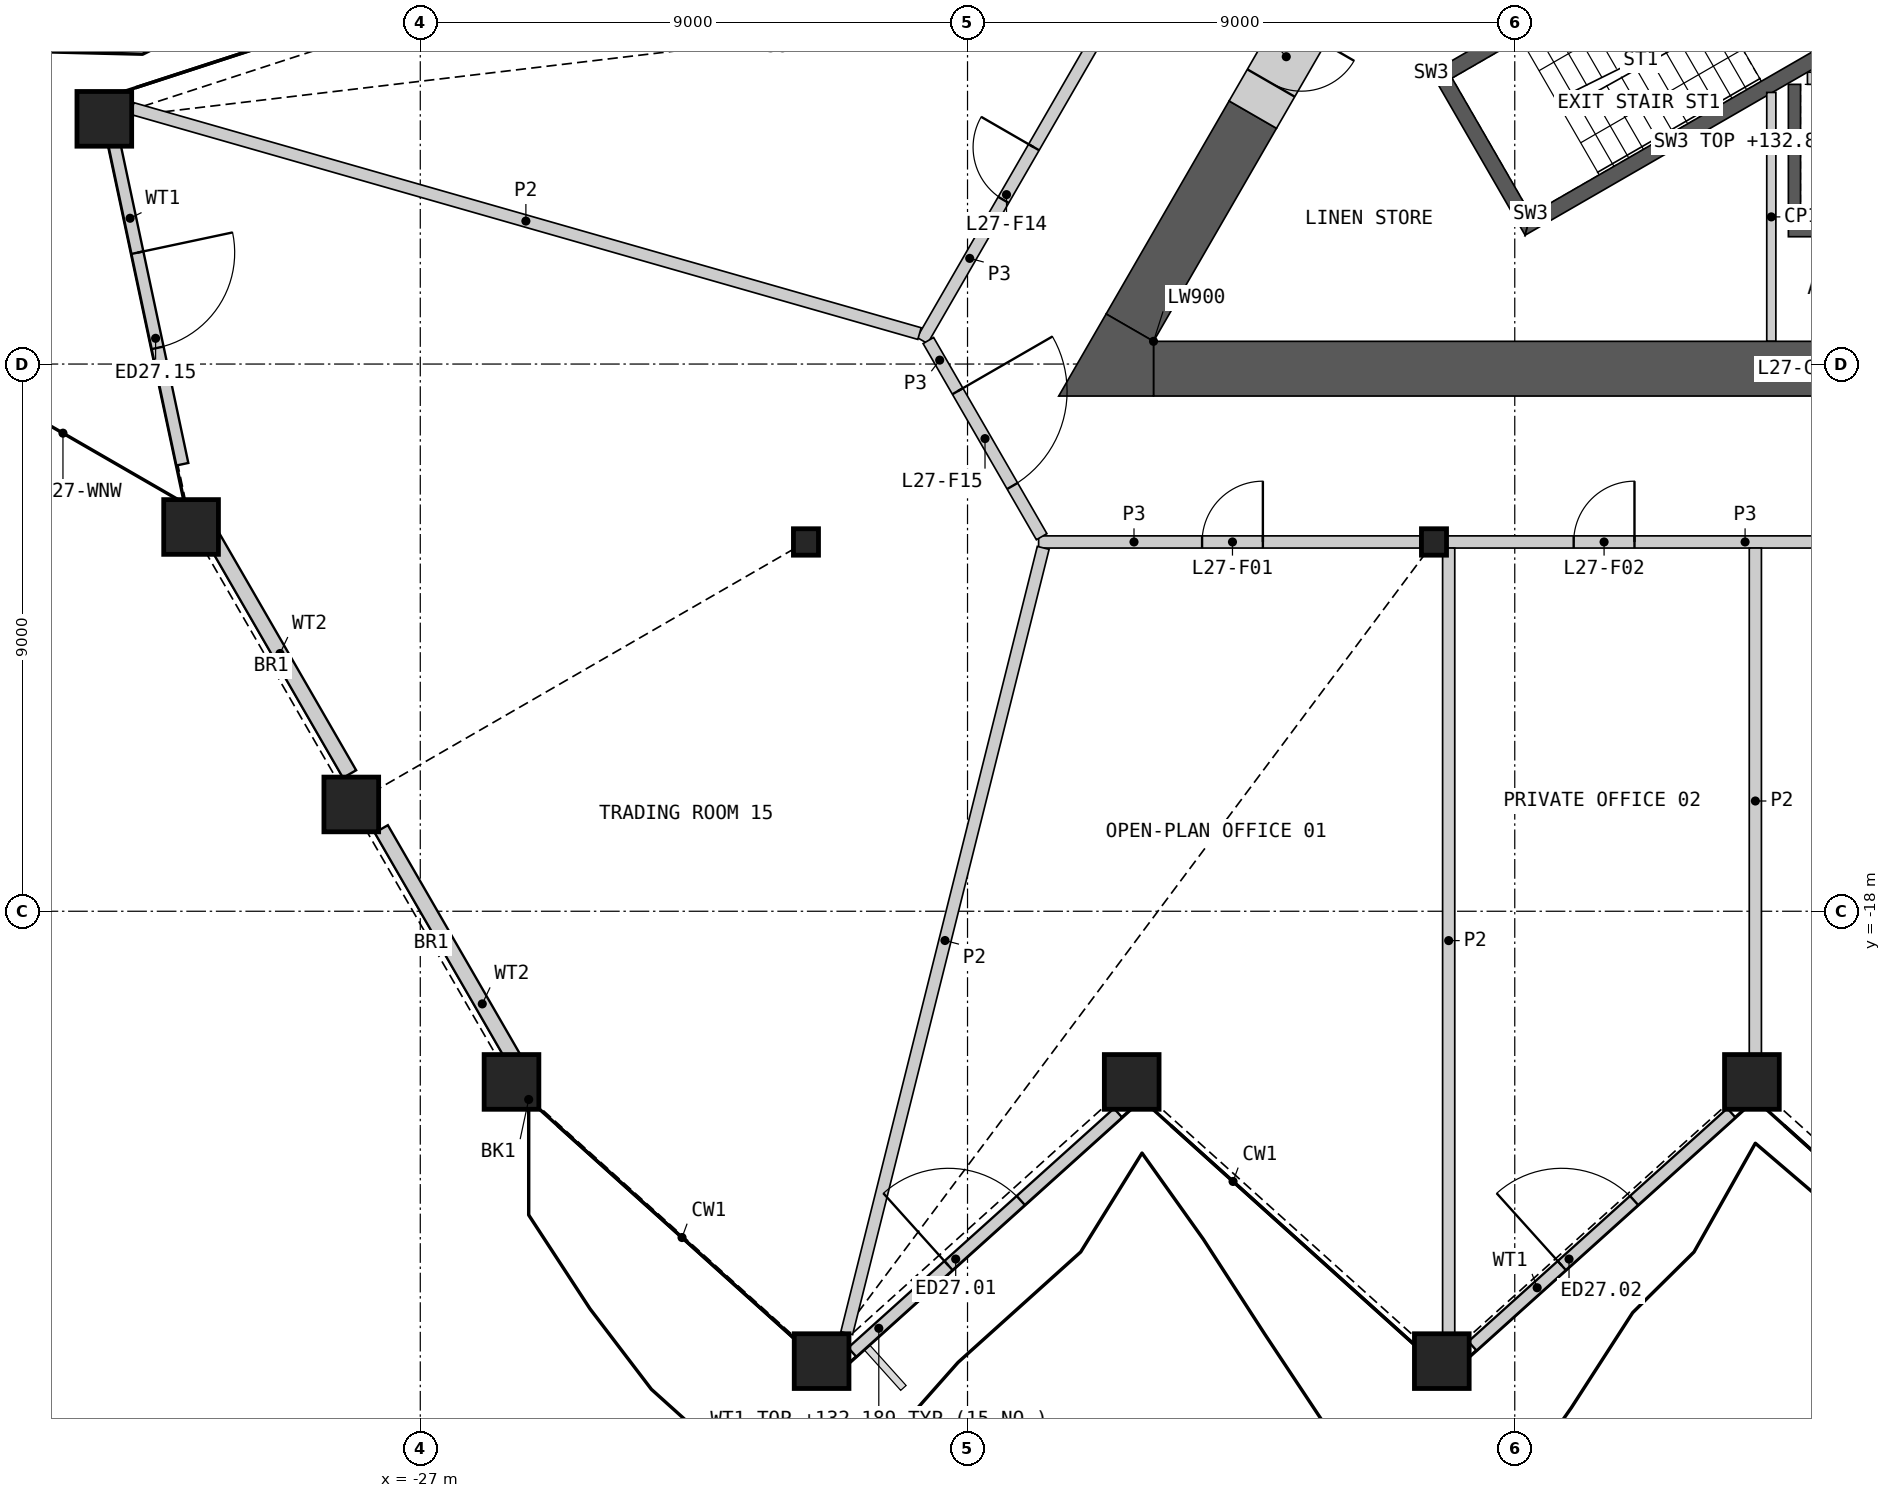
"""IFC4 building model, lengths in metres.
Left out: names, types, materials, properties, quantities, classifications, styles, units other than length and angle.
Written with IfcOpenShell. Run it as: python <this file> out.ifc"""

import sys

from ifc_helpers import new_model, si_unit, direction, frame, frame_2d, origin, origin_2d, place, context, subcontext, project, spatial, polyline, rectangle, hollow_rectangle, i_section, outline, extrude, element, fill, save


model = new_model("IFC4")
c1 = context("Model", 3, precision=1e-05, world=origin(), true_north=direction((0.0, 1.0)))
c2 = subcontext(c1, "Body", "Model", "MODEL_VIEW")
j1 = project(units=[si_unit("LENGTHUNIT", "METRE"), si_unit("PLANEANGLEUNIT", "RADIAN")], contexts=[c1])
p1 = place(None, origin())
s1 = spatial("IfcSite", under=j1, at=p1, CompositionType="ELEMENT")
p2 = place(p1, origin())
s2 = spatial("IfcBuilding", under=s1, at=p2, CompositionType="ELEMENT")
p3 = place(p2, frame((0.0, 0.0, 129.0)))
s3 = spatial("IfcBuildingStorey", under=s2, at=p3, CompositionType="ELEMENT", Elevation=129.0)
for number, where, z_axis, x_axis in (
    (1, (-25.5, -20.807, 0.0), (0.0, 0.0, 1.0), (1.0, 0.0, 0.0)),
    (2, (-20.4, -25.399, 0.0), (0.0, 0.0, 1.0), (1.0, 0.0, 0.0)),
    (3, (-15.3, -20.807, 0.0), (0.0, 0.0, 1.0), (1.0, 0.0, 0.0)),
    (4, (-10.2, -25.399, 0.0), (0.0, 0.0, 1.0), (1.0, 0.0, 0.0)),
    (5, (-5.1, -20.807, 0.0), (0.0, 0.0, 1.0), (1.0, 0.0, 0.0)),
    (6, (-32.196, -4.967, 0.0), (0.0, 0.0, 1.0), (1.0, 0.0, 0.0)),
    (7, (-30.769, -11.68, 0.0), (0.0, 0.0, 1.0), (1.0, 0.0, 0.0)),
    (8, (-28.135, -16.243, 0.0), (0.0, 0.0, 1.0), (1.0, 0.0, 0.0)),
):
    element("IfcColumn", number, at=place(p3, frame(where, z_axis=z_axis, x_axis=x_axis)), inside=s3, PredefinedType="COLUMN", context=c2, shape_type="SweptSolid", body=[
        extrude(hollow_rectangle(XDim=0.9, YDim=0.9, WallThickness=0.06, at=origin_2d()), origin(), (0.0, 0.0, 1.0), 4.2),
    ])
for number, where, z_axis, x_axis in (
    (9, (-20.657, -11.926, 0.0), (0.0, 0.0, 1.0), (1.0, 0.0, 0.0)),
    (10, (-10.328, -11.926, 0.0), (0.0, 0.0, 1.0), (1.0, 0.0, 0.0)),
):
    element("IfcColumn", number, at=place(p3, frame(where, z_axis=z_axis, x_axis=x_axis)), inside=s3, PredefinedType="COLUMN", context=c2, shape_type="SweptSolid", body=[
        extrude(i_section(OverallWidth=0.412, OverallDepth=0.435, WebThickness=0.036, FlangeThickness=0.057, at=origin_2d()), origin(), (0.0, 0.0, 1.0), 4.2),
    ])
p4 = place(p3, frame((-19.896, -25.253, 0.0), z_axis=(0.0, 0.0, 1.0), x_axis=(0.743157926671, 0.669116055723, 0.0)))
e11 = element("IfcWall", 11, at=p4, inside=s3, PredefinedType="SOLIDWALL", context=c2, shape_type="SweptSolid", body=[
    extrude(rectangle(XDim=5.882, YDim=0.2, at=frame_2d((2.941, 0.0))), origin(), (0.0, 0.0, 1.0), 3.189),
])
p5 = place(p4, frame((2.13, 0.0, 0.0)))
e12 = element("IfcOpeningElement", 12, at=p5, cuts=e11, PredefinedType="OPENING", context=c2, shape_type="SweptSolid", body=[
    extrude(rectangle(XDim=1.6, YDim=2.4, at=frame_2d((0.8, 1.2))), frame((0.0, 0.11, 0.0), z_axis=(0.0, -1.0, 0.0), x_axis=(1.0, 0.0, 0.0)), (0.0, 0.0, 1.0), 0.22),
])
p6 = place(p3, frame((-9.696, -25.151, 0.0), z_axis=(0.0, 0.0, 1.0), x_axis=(0.743141591148, 0.669134198428, 0.0)))
e13 = element("IfcWall", 13, at=p6, inside=s3, PredefinedType="SOLIDWALL", context=c2, shape_type="SweptSolid", body=[
    extrude(rectangle(XDim=5.73, YDim=0.2, at=frame_2d((2.865, 0.0))), origin(), (0.0, 0.0, 1.0), 3.189),
])
p7 = place(p6, frame((1.978, 0.0, 0.0)))
e14 = element("IfcOpeningElement", 14, at=p7, cuts=e13, PredefinedType="OPENING", context=c2, shape_type="SweptSolid", body=[
    extrude(rectangle(XDim=1.6, YDim=2.4, at=frame_2d((0.8, 1.2))), frame((0.0, 0.11, 0.0), z_axis=(0.0, -1.0, 0.0), x_axis=(1.0, 0.0, 0.0)), (0.0, 0.0, 1.0), 0.22),
])
p8 = place(p3, frame((-32.059, -5.254, 0.0), z_axis=(0.0, 0.0, 1.0), x_axis=(0.207902173992, -0.978149623549, 0.0)))
e15 = element("IfcWall", 15, at=p8, inside=s3, PredefinedType="SOLIDWALL", context=c2, shape_type="SweptSolid", body=[
    extrude(rectangle(XDim=5.515, YDim=0.2, at=frame_2d((2.757, 0.0))), origin(), (0.0, 0.0, 1.0), 3.189),
])
p9 = place(p8, frame((1.957, 0.0, 0.0)))
e16 = element("IfcOpeningElement", 16, at=p9, cuts=e15, PredefinedType="OPENING", context=c2, shape_type="SweptSolid", body=[
    extrude(rectangle(XDim=1.6, YDim=2.4, at=frame_2d((0.8, 1.2))), frame((0.0, 0.11, 0.0), z_axis=(0.0, -1.0, 0.0), x_axis=(1.0, 0.0, 0.0)), (0.0, 0.0, 1.0), 0.22),
])
p10 = place(p3, frame((-30.452, -11.779, 0.0), z_axis=(0.0, 0.0, 1.0), x_axis=(0.500016357846, -0.866015959371, 0.0)))
e17 = element("IfcWall", 17, at=p10, inside=s3, PredefinedType="SOLIDWALL", context=c2, shape_type="SweptSolid", body=[
    extrude(rectangle(XDim=4.578, YDim=0.25, at=frame_2d((2.289, 0.0))), origin(), (0.0, 0.0, 1.0), 3.189),
])
p11 = place(p3, frame((-27.641, -16.647, 0.0), z_axis=(0.0, 0.0, 1.0), x_axis=(0.499968989506, -0.866043306961, 0.0)))
e18 = element("IfcWall", 18, at=p11, inside=s3, PredefinedType="SOLIDWALL", context=c2, shape_type="SweptSolid", body=[
    extrude(rectangle(XDim=4.429, YDim=0.25, at=frame_2d((2.214, 0.0))), origin(), (0.0, 0.0, 1.0), 3.189),
])
p12 = place(p3, origin())
e19 = element("IfcWall", 19, at=p12, inside=s3, PredefinedType="SHEAR", context=c2, shape_type="SweptSolid", body=[
    extrude(outline(polyline([(4.5, -4.4), (4.5, -6.906), (-4.5, -6.906), (-4.5, -4.4), (-4.3, -4.4), (-4.3, -6.7), (-2.3, -6.7), (-2.3, -4.4), (-2.1, -4.4), (-2.1, -6.7), (-0.1, -6.7), (-0.1, -4.4), (0.1, -4.4), (0.1, -6.7), (2.1, -6.7), (2.1, -4.4), (2.3, -4.4), (2.3, -6.7), (4.3, -6.7), (4.3, -4.4), (4.5, -4.4)])), origin(), (0.0, 0.0, 1.0), 3.8),
])
p13 = place(p3, frame((-4.187, -4.3, 0.0), z_axis=(0.0, 0.0, 1.0), x_axis=(1.0, 0.0, 0.0)))
e20 = element("IfcWall", 20, at=p13, inside=s3, PredefinedType="SOLIDWALL", context=c2, shape_type="SweptSolid", body=[
    extrude(rectangle(XDim=8.373, YDim=0.2, at=frame_2d((4.187, 0.0))), origin(), (0.0, 0.0, 1.0), 3.8),
])
p14 = place(p13, frame((0.287, 0.0, 0.0)))
e21 = element("IfcOpeningElement", 21, at=p14, cuts=e20, PredefinedType="OPENING", context=c2, shape_type="SweptSolid", body=[
    extrude(rectangle(XDim=1.2, YDim=2.1, at=frame_2d((0.6, 1.05))), frame((0.0, 0.11, 0.0), z_axis=(0.0, -1.0, 0.0), x_axis=(1.0, 0.0, 0.0)), (0.0, 0.0, 1.0), 0.22),
])
p15 = place(p13, frame((2.387, 0.0, 0.0)))
e22 = element("IfcOpeningElement", 22, at=p15, cuts=e20, PredefinedType="OPENING", context=c2, shape_type="SweptSolid", body=[
    extrude(rectangle(XDim=1.4, YDim=2.1, at=frame_2d((0.7, 1.05))), frame((0.0, 0.11, 0.0), z_axis=(0.0, -1.0, 0.0), x_axis=(1.0, 0.0, 0.0)), (0.0, 0.0, 1.0), 0.22),
])
p16 = place(p13, frame((4.737, 0.0, 0.0)))
e23 = element("IfcOpeningElement", 23, at=p16, cuts=e20, PredefinedType="OPENING", context=c2, shape_type="SweptSolid", body=[
    extrude(rectangle(XDim=1.1, YDim=2.1, at=frame_2d((0.55, 1.05))), frame((0.0, 0.11, 0.0), z_axis=(0.0, -1.0, 0.0), x_axis=(1.0, 0.0, 0.0)), (0.0, 0.0, 1.0), 0.22),
])
p17 = place(p13, frame((6.887, 0.0, 0.0)))
e24 = element("IfcOpeningElement", 24, at=p17, cuts=e20, PredefinedType="OPENING", context=c2, shape_type="SweptSolid", body=[
    extrude(rectangle(XDim=1.2, YDim=2.1, at=frame_2d((0.6, 1.05))), frame((0.0, 0.11, 0.0), z_axis=(0.0, -1.0, 0.0), x_axis=(1.0, 0.0, 0.0)), (0.0, 0.0, 1.0), 0.22),
])
p18 = place(p3, origin())
e25 = element("IfcWall", 25, at=p18, inside=s3, PredefinedType="SHEAR", context=c2, shape_type="SweptSolid", body=[
    extrude(outline(polyline([(-5.307, -1.281), (-10.374, -4.206), (-10.032, -4.298), (-5.182, -1.498), (-5.307, -1.281)])), origin(), (0.0, 0.0, 1.0), 3.8),
])
p19 = place(p3, origin())
e26 = element("IfcWall", 26, at=p19, inside=s3, PredefinedType="SHEAR", context=c2, shape_type="SweptSolid", body=[
    extrude(outline(polyline([(-10.374, -4.206), (-8.83, -6.881), (-8.738, -6.539), (-10.032, -4.298), (-10.374, -4.206)])), origin(), (0.0, 0.0, 1.0), 3.8),
])
p20 = place(p3, origin())
e27 = element("IfcWall", 27, at=p20, inside=s3, PredefinedType="SHEAR", context=c2, shape_type="SweptSolid", body=[
    extrude(outline(polyline([(-8.738, -6.539), (-8.83, -6.881), (-3.763, -3.956), (-3.888, -3.739), (-8.738, -6.539)])), origin(), (0.0, 0.0, 1.0), 3.8),
])
p21 = place(p3, frame((-5.199, -1.219, 0.0), z_axis=(0.0, 0.0, 1.0), x_axis=(0.499982516597, -0.866035497597, 0.0)))
e28 = element("IfcWall", 28, at=p21, inside=s3, PredefinedType="SHEAR", context=c2, shape_type="SweptSolid", body=[
    extrude(rectangle(XDim=3.088, YDim=0.25, at=frame_2d((1.544, 0.0))), origin(), (0.0, 0.0, 1.0), 3.8),
])
p22 = place(p21, frame((0.994, 0.0, 0.0)))
e29 = element("IfcOpeningElement", 29, at=p22, cuts=e28, PredefinedType="OPENING", context=c2, shape_type="SweptSolid", body=[
    extrude(rectangle(XDim=1.1, YDim=2.1, at=frame_2d((0.55, 1.05))), frame((0.0, 0.135, 0.0), z_axis=(0.0, -1.0, 0.0), x_axis=(1.0, 0.0, 0.0)), (0.0, 0.0, 1.0), 0.27),
])
p23 = place(p3, frame((-4.781, -8.626, 0.0), z_axis=(0.0, 0.0, 1.0), x_axis=(0.0, 1.0, 0.0)))
e30 = element("IfcWall", 30, at=p23, inside=s3, PredefinedType="PARTITIONING", context=c2, shape_type="SweptSolid", body=[
    extrude(rectangle(XDim=4.093, YDim=0.15, at=frame_2d((2.047, 0.0))), origin(), (0.0, 0.0, 1.0), 3.8),
])
p24 = place(p3, frame((-14.941, -9.076, 0.0), z_axis=(0.0, 0.0, 1.0), x_axis=(1.0, 0.0, 0.0)))
e31 = element("IfcWall", 31, at=p24, inside=s3, PredefinedType="SHEAR", context=c2, shape_type="SweptSolid", body=[
    extrude(rectangle(XDim=11.275, YDim=0.9, at=frame_2d((5.638, 0.0))), origin(), (0.0, 0.0, 1.0), 3.8),
])
p25 = place(p3, frame((-13.308, -4.898, 0.0), z_axis=(0.0, 0.0, 1.0), x_axis=(-0.499974938593, -0.866039872511, 0.0)))
e32 = element("IfcWall", 32, at=p25, inside=s3, PredefinedType="SHEAR", context=c2, shape_type="SweptSolid", body=[
    extrude(rectangle(XDim=4.046, YDim=0.9, at=frame_2d((2.023, 0.0))), origin(), (0.0, 0.0, 1.0), 3.8),
])
p26 = place(p3, origin())
e33 = element("IfcWall", 33, at=p26, inside=s3, PredefinedType="SHEAR", context=c2, shape_type="SweptSolid", body=[
    extrude(outline(polyline([(-14.941, -8.626), (-14.941, -9.526), (-16.5, -9.526), (-15.721, -8.176), (-14.941, -8.626)])), origin(), (0.0, 0.0, 1.0), 3.8),
])
p27 = place(p3, frame((-12.208, -2.992, 0.0), z_axis=(0.0, 0.0, 1.0), x_axis=(-0.50002983664, -0.866008176907, 0.0)))
e34 = element("IfcWall", 34, at=p27, inside=s3, PredefinedType="SHEAR", context=c2, shape_type="SweptSolid", body=[
    extrude(rectangle(XDim=2.2, YDim=0.9, at=frame_2d((1.1, 0.0))), origin(), (0.0, 0.0, 1.0), 3.8),
])
p28 = place(p27, frame((0.6, 0.0, 0.0)))
e35 = element("IfcOpeningElement", 35, at=p28, cuts=e34, PredefinedType="OPENING", context=c2, shape_type="SweptSolid", body=[
    extrude(rectangle(XDim=1.0, YDim=2.1, at=frame_2d((0.5, 1.05))), frame((0.0, 0.46, 0.0), z_axis=(0.0, -1.0, 0.0), x_axis=(1.0, 0.0, 0.0)), (0.0, 0.0, 1.0), 0.92),
])
p29 = place(p3, frame((-10.197, -11.926, 0.0), z_axis=(0.0, 0.0, 1.0), x_axis=(1.0, 0.0, 0.0)))
e36 = element("IfcWall", 36, at=p29, inside=s3, PredefinedType="PARTITIONING", context=c2, shape_type="SweptSolid", body=[
    extrude(rectangle(XDim=9.969, YDim=0.2, at=frame_2d((4.985, 0.0))), origin(), (0.0, 0.0, 1.0), 3.8),
])
p30 = place(p29, frame((2.166, 0.0, 0.0)))
e37 = element("IfcOpeningElement", 37, at=p30, cuts=e36, PredefinedType="OPENING", context=c2, shape_type="SweptSolid", body=[
    extrude(rectangle(XDim=1.0, YDim=2.1, at=frame_2d((0.5, 1.05))), frame((0.0, 0.11, 0.0), z_axis=(0.0, -1.0, 0.0), x_axis=(1.0, 0.0, 0.0)), (0.0, 0.0, 1.0), 0.22),
])
p31 = place(p29, frame((7.106, 0.0, 0.0)))
e38 = element("IfcOpeningElement", 38, at=p31, cuts=e36, PredefinedType="OPENING", context=c2, shape_type="SweptSolid", body=[
    extrude(rectangle(XDim=1.0, YDim=2.1, at=frame_2d((0.5, 1.05))), frame((0.0, 0.11, 0.0), z_axis=(0.0, -1.0, 0.0), x_axis=(1.0, 0.0, 0.0)), (0.0, 0.0, 1.0), 0.22),
])
p32 = place(p3, frame((-16.831, -11.926, 0.0), z_axis=(0.0, 0.0, 1.0), x_axis=(1.0, 0.0, 0.0)))
e39 = element("IfcWall", 39, at=p32, inside=s3, PredefinedType="PARTITIONING", context=c2, shape_type="SweptSolid", body=[
    extrude(rectangle(XDim=6.275, YDim=0.2, at=frame_2d((3.137, 0.0))), origin(), (0.0, 0.0, 1.0), 3.8),
])
p33 = place(p32, frame((2.688, 0.0, 0.0)))
e40 = element("IfcOpeningElement", 40, at=p33, cuts=e39, PredefinedType="OPENING", context=c2, shape_type="SweptSolid", body=[
    extrude(rectangle(XDim=1.0, YDim=2.1, at=frame_2d((0.5, 1.05))), frame((0.0, 0.11, 0.0), z_axis=(0.0, -1.0, 0.0), x_axis=(1.0, 0.0, 0.0)), (0.0, 0.0, 1.0), 0.22),
])
p34 = place(p3, frame((-18.744, -8.613, 0.0), z_axis=(0.0, 0.0, 1.0), x_axis=(0.499997920671, 0.866026604282, 0.0)))
e41 = element("IfcWall", 41, at=p34, inside=s3, PredefinedType="PARTITIONING", context=c2, shape_type="SweptSolid", body=[
    extrude(rectangle(XDim=6.24, YDim=0.2, at=frame_2d((3.12, 0.0))), origin(), (0.0, 0.0, 1.0), 3.8),
])
p35 = place(p34, frame((2.67, 0.0, 0.0)))
e42 = element("IfcOpeningElement", 42, at=p35, cuts=e41, PredefinedType="OPENING", context=c2, shape_type="SweptSolid", body=[
    extrude(rectangle(XDim=1.0, YDim=2.1, at=frame_2d((0.5, 1.05))), frame((0.0, 0.11, 0.0), z_axis=(0.0, -1.0, 0.0), x_axis=(1.0, 0.0, 0.0)), (0.0, 0.0, 1.0), 0.22),
])
p36 = place(p3, frame((-18.644, -8.613, 0.0), z_axis=(0.0, 0.0, 1.0), x_axis=(0.499958791762, -0.866049194065, 0.0)))
e43 = element("IfcWall", 43, at=p36, inside=s3, PredefinedType="PARTITIONING", context=c2, shape_type="SweptSolid", body=[
    extrude(rectangle(XDim=3.726, YDim=0.2, at=frame_2d((1.863, 0.0))), origin(), (0.0, 0.0, 1.0), 3.8),
])
p37 = place(p36, frame((0.963, 0.0, 0.0)))
e44 = element("IfcOpeningElement", 44, at=p37, cuts=e43, PredefinedType="OPENING", context=c2, shape_type="SweptSolid", body=[
    extrude(rectangle(XDim=1.8, YDim=2.1, at=frame_2d((0.9, 1.05))), frame((0.0, 0.11, 0.0), z_axis=(0.0, -1.0, 0.0), x_axis=(1.0, 0.0, 0.0)), (0.0, 0.0, 1.0), 0.22),
])
p38 = place(p3, frame((-31.736, -4.798, 0.0), z_axis=(0.0, 0.0, 1.0), x_axis=(0.961478776026, -0.274879179372, 0.0)))
e45 = element("IfcWall", 45, at=p38, inside=s3, PredefinedType="PARTITIONING", context=c2, shape_type="SweptSolid", body=[
    extrude(rectangle(XDim=13.465, YDim=0.2, at=frame_2d((6.732, 0.0))), origin(), (0.0, 0.0, 1.0), 2.885),
])
p39 = place(p3, frame((-19.987, -24.939, 0.0), z_axis=(0.0, 0.0, 1.0), x_axis=(0.242708204495, 0.97009933897, 0.0)))
e46 = element("IfcWall", 46, at=p39, inside=s3, PredefinedType="PARTITIONING", context=c2, shape_type="SweptSolid", body=[
    extrude(rectangle(XDim=13.314, YDim=0.2, at=frame_2d((6.657, 0.0))), origin(), (0.0, 0.0, 1.0), 2.885),
])
p40 = place(p3, frame((-10.087, -24.939, 0.0), z_axis=(0.0, 0.0, 1.0), x_axis=(0.0, 1.0, 0.0)))
e47 = element("IfcWall", 47, at=p40, inside=s3, PredefinedType="PARTITIONING", context=c2, shape_type="SweptSolid", body=[
    extrude(rectangle(XDim=12.913, YDim=0.2, at=frame_2d((6.457, 0.0))), origin(), (0.0, 0.0, 1.0), 2.885),
])
p41 = place(p3, frame((-5.043, -20.347, 0.0), z_axis=(0.0, 0.0, 1.0), x_axis=(0.0, 1.0, 0.0)))
e48 = element("IfcWall", 48, at=p41, inside=s3, PredefinedType="PARTITIONING", context=c2, shape_type="SweptSolid", body=[
    extrude(rectangle(XDim=8.321, YDim=0.2, at=frame_2d((4.16, 0.0))), origin(), (0.0, 0.0, 1.0), 2.885),
])
p42 = place(p5, origin())
e49 = element("IfcDoor", 49, at=p42, inside=s3, OperationType="DOUBLE_DOOR_SINGLE_SWING", PredefinedType="DOOR", context=c2, shape_type="SweptSolid", body=[
    extrude(rectangle(XDim=1.6, YDim=2.4, at=frame_2d((0.8, 1.2))), frame((0.0, 0.025, 0.0), z_axis=(0.0, -1.0, 0.0), x_axis=(1.0, 0.0, 0.0)), (0.0, 0.0, 1.0), 0.05),
])
fill(e12, e49)
p43 = place(p7, origin())
e50 = element("IfcDoor", 50, at=p43, inside=s3, OperationType="DOUBLE_DOOR_SINGLE_SWING", PredefinedType="DOOR", context=c2, shape_type="SweptSolid", body=[
    extrude(rectangle(XDim=1.6, YDim=2.4, at=frame_2d((0.8, 1.2))), frame((0.0, 0.025, 0.0), z_axis=(0.0, -1.0, 0.0), x_axis=(1.0, 0.0, 0.0)), (0.0, 0.0, 1.0), 0.05),
])
fill(e14, e50)
p44 = place(p9, origin())
e51 = element("IfcDoor", 51, at=p44, inside=s3, OperationType="DOUBLE_DOOR_SINGLE_SWING", PredefinedType="DOOR", context=c2, shape_type="SweptSolid", body=[
    extrude(rectangle(XDim=1.6, YDim=2.4, at=frame_2d((0.8, 1.2))), frame((0.0, 0.025, 0.0), z_axis=(0.0, -1.0, 0.0), x_axis=(1.0, 0.0, 0.0)), (0.0, 0.0, 1.0), 0.05),
])
fill(e16, e51)
p45 = place(p28, origin())
e52 = element("IfcDoor", 52, at=p45, inside=s3, OperationType="SINGLE_SWING_LEFT", PredefinedType="DOOR", context=c2, shape_type="SweptSolid", body=[
    extrude(rectangle(XDim=1.0, YDim=2.1, at=frame_2d((0.5, 1.05))), frame((0.0, 0.205, 0.0), z_axis=(0.0, -1.0, 0.0), x_axis=(1.0, 0.0, 0.0)), (0.0, 0.0, 1.0), 0.05),
])
fill(e35, e52)
p46 = place(p33, origin())
e53 = element("IfcDoor", 53, at=p46, inside=s3, OperationType="SINGLE_SWING_RIGHT", PredefinedType="DOOR", context=c2, shape_type="SweptSolid", body=[
    extrude(rectangle(XDim=1.0, YDim=2.1, at=frame_2d((0.5, 1.05))), frame((0.0, 0.025, 0.0), z_axis=(0.0, -1.0, 0.0), x_axis=(1.0, 0.0, 0.0)), (0.0, 0.0, 1.0), 0.05),
])
fill(e40, e53)
p47 = place(p30, origin())
e54 = element("IfcDoor", 54, at=p47, inside=s3, OperationType="SINGLE_SWING_RIGHT", PredefinedType="DOOR", context=c2, shape_type="SweptSolid", body=[
    extrude(rectangle(XDim=1.0, YDim=2.1, at=frame_2d((0.5, 1.05))), frame((0.0, 0.025, 0.0), z_axis=(0.0, -1.0, 0.0), x_axis=(1.0, 0.0, 0.0)), (0.0, 0.0, 1.0), 0.05),
])
fill(e37, e54)
p48 = place(p35, origin())
e55 = element("IfcDoor", 55, at=p48, inside=s3, OperationType="SINGLE_SWING_RIGHT", PredefinedType="DOOR", context=c2, shape_type="SweptSolid", body=[
    extrude(rectangle(XDim=1.0, YDim=2.1, at=frame_2d((0.5, 1.05))), frame((0.0, 0.025, 0.0), z_axis=(0.0, -1.0, 0.0), x_axis=(1.0, 0.0, 0.0)), (0.0, 0.0, 1.0), 0.05),
])
fill(e42, e55)
p49 = place(p37, origin())
e56 = element("IfcDoor", 56, at=p49, inside=s3, OperationType="DOUBLE_DOOR_SINGLE_SWING", PredefinedType="DOOR", context=c2, shape_type="SweptSolid", body=[
    extrude(rectangle(XDim=1.8, YDim=2.1, at=frame_2d((0.9, 1.05))), frame((0.0, 0.025, 0.0), z_axis=(0.0, -1.0, 0.0), x_axis=(1.0, 0.0, 0.0)), (0.0, 0.0, 1.0), 0.05),
])
fill(e44, e56)
save(model, sys.argv[1])
